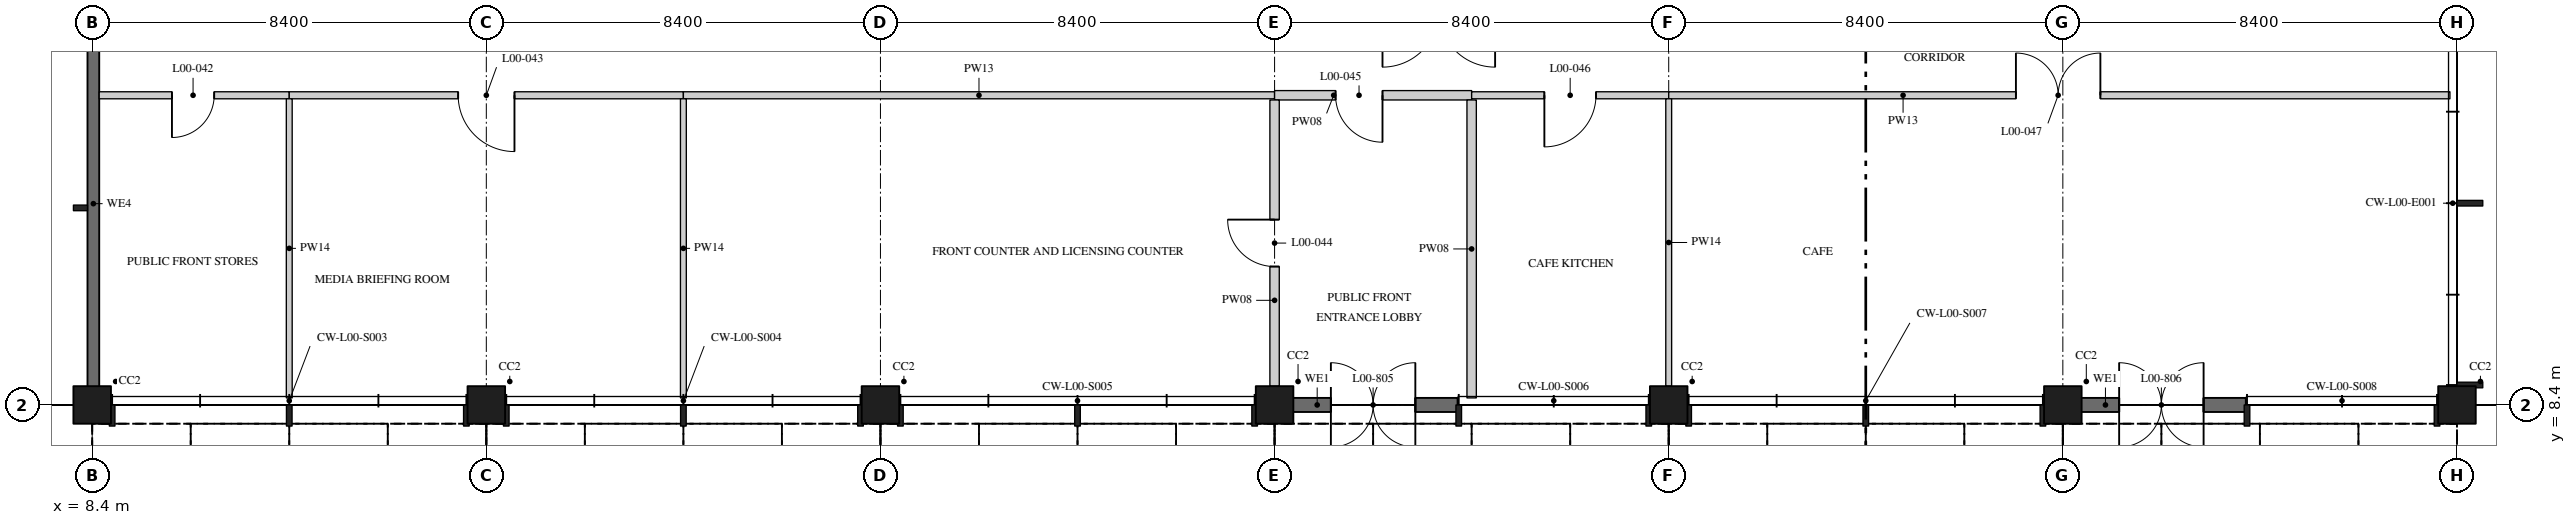
"""IFC4 building model, lengths in metres.
Left out: names, types, materials, properties, quantities, classifications, styles, units other than length and angle.
Written with IfcOpenShell. Run it as: python <this file> out.ifc"""

import sys

from ifc_helpers import new_model, si_unit, direction, frame, frame_2d, origin, origin_2d, place, context, subcontext, project, spatial, rectangle, extrude, element, fill, save


model = new_model("IFC4")
c1 = context("Model", 3, precision=1e-05, world=origin(), true_north=direction((0.0, 1.0)))
c2 = subcontext(c1, "Body", "Model", "MODEL_VIEW")
j1 = project(units=[si_unit("LENGTHUNIT", "METRE"), si_unit("PLANEANGLEUNIT", "RADIAN")], contexts=[c1])
p1 = place(None, origin())
s1 = spatial("IfcSite", under=j1, at=p1, CompositionType="ELEMENT")
p2 = place(p1, origin())
s2 = spatial("IfcBuilding", under=s1, at=p2, CompositionType="ELEMENT")
p3 = place(p2, origin())
s3 = spatial("IfcBuildingStorey", under=s2, at=p3, CompositionType="ELEMENT", Elevation=0.0)
for number, where, z_axis, x_axis in (
    (1, (8.4, 8.4, 0.0), (0.0, 0.0, 1.0), (1.0, 0.0, 0.0)),
    (2, (16.8, 8.4, 0.0), (0.0, 0.0, 1.0), (1.0, 0.0, 0.0)),
    (3, (25.2, 8.4, 0.0), (0.0, 0.0, 1.0), (1.0, 0.0, 0.0)),
    (4, (33.6, 8.4, 0.0), (0.0, 0.0, 1.0), (1.0, 0.0, 0.0)),
    (5, (42.0, 8.4, 0.0), (0.0, 0.0, 1.0), (1.0, 0.0, 0.0)),
    (6, (50.4, 8.4, 0.0), (0.0, 0.0, 1.0), (1.0, 0.0, 0.0)),
    (7, (58.8, 8.4, 0.0), (0.0, 0.0, 1.0), (1.0, 0.0, 0.0)),
):
    element("IfcColumn", number, at=place(p3, frame(where, z_axis=z_axis, x_axis=x_axis)), inside=s3, PredefinedType="COLUMN", context=c2, shape_type="SweptSolid", body=[
        extrude(rectangle(XDim=0.8, YDim=0.8, at=origin_2d()), origin(), (0.0, 0.0, 1.0), 5.05),
    ])
p4 = place(p3, frame((8.55, 15.0, 0.0), z_axis=(0.0, 0.0, 1.0), x_axis=(1.0, 0.0, 0.0)))
e8 = element("IfcWall", 8, at=p4, inside=s3, PredefinedType="PARTITIONING", context=c2, shape_type="SweptSolid", body=[
    extrude(rectangle(XDim=4.05, YDim=0.15, at=frame_2d((2.025, 0.0))), origin(), (0.0, 0.0, 1.0), 5.05),
])
p5 = place(p4, frame((1.55, 0.0, 0.0)))
e9 = element("IfcOpeningElement", 9, at=p5, cuts=e8, PredefinedType="OPENING", context=c2, shape_type="SweptSolid", body=[
    extrude(rectangle(XDim=0.9, YDim=2.1, at=frame_2d((0.45, 1.05))), frame((0.0, 0.085, 0.0), z_axis=(0.0, -1.0, 0.0), x_axis=(1.0, 0.0, 0.0)), (0.0, 0.0, 1.0), 0.17),
])
p6 = place(p3, frame((12.6, 15.0, 0.0), z_axis=(0.0, 0.0, 1.0), x_axis=(1.0, 0.0, 0.0)))
e10 = element("IfcWall", 10, at=p6, inside=s3, PredefinedType="PARTITIONING", context=c2, shape_type="SweptSolid", body=[
    extrude(rectangle(XDim=8.4, YDim=0.15, at=frame_2d((4.2, 0.0))), origin(), (0.0, 0.0, 1.0), 5.05),
])
p7 = place(p6, frame((3.6, 0.0, 0.0)))
e11 = element("IfcOpeningElement", 11, at=p7, cuts=e10, PredefinedType="OPENING", context=c2, shape_type="SweptSolid", body=[
    extrude(rectangle(XDim=1.2, YDim=2.4, at=frame_2d((0.6, 1.2))), frame((0.0, 0.085, 0.0), z_axis=(0.0, -1.0, 0.0), x_axis=(1.0, 0.0, 0.0)), (0.0, 0.0, 1.0), 0.17),
])
p8 = place(p3, frame((21.0, 15.0, 0.0), z_axis=(0.0, 0.0, 1.0), x_axis=(1.0, 0.0, 0.0)))
e12 = element("IfcWall", 12, at=p8, inside=s3, PredefinedType="PARTITIONING", context=c2, shape_type="SweptSolid", body=[
    extrude(rectangle(XDim=12.6, YDim=0.15, at=frame_2d((6.3, 0.0))), origin(), (0.0, 0.0, 1.0), 5.05),
])
p9 = place(p3, frame((33.6, 15.0, 0.0), z_axis=(0.0, 0.0, 1.0), x_axis=(1.0, 0.0, 0.0)))
e13 = element("IfcWall", 13, at=p9, inside=s3, PredefinedType="PARTITIONING", context=c2, shape_type="SweptSolid", body=[
    extrude(rectangle(XDim=4.2, YDim=0.2, at=frame_2d((2.1, 0.0))), origin(), (0.0, 0.0, 1.0), 5.05),
])
p10 = place(p9, frame((1.3, 0.0, 0.0)))
e14 = element("IfcOpeningElement", 14, at=p10, cuts=e13, PredefinedType="OPENING", context=c2, shape_type="SweptSolid", body=[
    extrude(rectangle(XDim=1.0, YDim=2.4, at=frame_2d((0.5, 1.2))), frame((0.0, 0.11, 0.0), z_axis=(0.0, -1.0, 0.0), x_axis=(1.0, 0.0, 0.0)), (0.0, 0.0, 1.0), 0.22),
])
p11 = place(p3, frame((37.8, 15.0, 0.0), z_axis=(0.0, 0.0, 1.0), x_axis=(1.0, 0.0, 0.0)))
e15 = element("IfcWall", 15, at=p11, inside=s3, PredefinedType="PARTITIONING", context=c2, shape_type="SweptSolid", body=[
    extrude(rectangle(XDim=4.2, YDim=0.15, at=frame_2d((2.1, 0.0))), origin(), (0.0, 0.0, 1.0), 5.05),
])
p12 = place(p11, frame((1.55, 0.0, 0.0)))
e16 = element("IfcOpeningElement", 16, at=p12, cuts=e15, PredefinedType="OPENING", context=c2, shape_type="SweptSolid", body=[
    extrude(rectangle(XDim=1.1, YDim=2.1, at=frame_2d((0.55, 1.05))), frame((0.0, 0.085, 0.0), z_axis=(0.0, -1.0, 0.0), x_axis=(1.0, 0.0, 0.0)), (0.0, 0.0, 1.0), 0.17),
])
p13 = place(p3, frame((42.0, 15.0, 0.0), z_axis=(0.0, 0.0, 1.0), x_axis=(1.0, 0.0, 0.0)))
e17 = element("IfcWall", 17, at=p13, inside=s3, PredefinedType="PARTITIONING", context=c2, shape_type="SweptSolid", body=[
    extrude(rectangle(XDim=16.65, YDim=0.15, at=frame_2d((8.325, 0.0))), origin(), (0.0, 0.0, 1.0), 5.05),
])
p14 = place(p13, frame((7.4, 0.0, 0.0)))
e18 = element("IfcOpeningElement", 18, at=p14, cuts=e17, PredefinedType="OPENING", context=c2, shape_type="SweptSolid", body=[
    extrude(rectangle(XDim=1.8, YDim=2.4, at=frame_2d((0.9, 1.2))), frame((0.0, 0.085, 0.0), z_axis=(0.0, -1.0, 0.0), x_axis=(1.0, 0.0, 0.0)), (0.0, 0.0, 1.0), 0.17),
])
for number, where, z_axis, x_axis in (
    (19, (12.6, 8.55, 0.0), (0.0, 0.0, 1.0), (0.0, 1.0, 0.0)),
    (20, (21.0, 8.55, 0.0), (0.0, 0.0, 1.0), (0.0, 1.0, 0.0)),
):
    element("IfcWall", number, at=place(p3, frame(where, z_axis=z_axis, x_axis=x_axis)), inside=s3, PredefinedType="PARTITIONING", context=c2, shape_type="SweptSolid", body=[
        extrude(rectangle(XDim=6.375, YDim=0.125, at=frame_2d((3.188, 0.0))), origin(), (0.0, 0.0, 1.0), 5.05),
    ])
p15 = place(p3, frame((33.6, 8.8, 0.0), z_axis=(0.0, 0.0, 1.0), x_axis=(0.0, 1.0, 0.0)))
e21 = element("IfcWall", 21, at=p15, inside=s3, PredefinedType="PARTITIONING", context=c2, shape_type="SweptSolid", body=[
    extrude(rectangle(XDim=6.1, YDim=0.2, at=frame_2d((3.05, 0.0))), origin(), (0.0, 0.0, 1.0), 5.05),
])
p16 = place(p15, frame((2.55, 0.0, 0.0)))
e22 = element("IfcOpeningElement", 22, at=p16, cuts=e21, PredefinedType="OPENING", context=c2, shape_type="SweptSolid", body=[
    extrude(rectangle(XDim=1.0, YDim=2.4, at=frame_2d((0.5, 1.2))), frame((0.0, 0.11, 0.0), z_axis=(0.0, -1.0, 0.0), x_axis=(1.0, 0.0, 0.0)), (0.0, 0.0, 1.0), 0.22),
])
p17 = place(p3, frame((37.8, 8.55, 0.0), z_axis=(0.0, 0.0, 1.0), x_axis=(0.0, 1.0, 0.0)))
e23 = element("IfcWall", 23, at=p17, inside=s3, PredefinedType="PARTITIONING", context=c2, shape_type="SweptSolid", body=[
    extrude(rectangle(XDim=6.35, YDim=0.2, at=frame_2d((3.175, 0.0))), origin(), (0.0, 0.0, 1.0), 5.05),
])
p18 = place(p3, frame((42.0, 8.8, 0.0), z_axis=(0.0, 0.0, 1.0), x_axis=(0.0, 1.0, 0.0)))
e24 = element("IfcWall", 24, at=p18, inside=s3, PredefinedType="PARTITIONING", context=c2, shape_type="SweptSolid", body=[
    extrude(rectangle(XDim=6.125, YDim=0.125, at=frame_2d((3.062, 0.0))), origin(), (0.0, 0.0, 1.0), 5.05),
])
p19 = place(p3, frame((8.425, 16.6, 0.0), z_axis=(0.0, 0.0, 1.0), x_axis=(0.0, -1.0, 0.0)))
e25 = element("IfcWall", 25, at=p19, inside=s3, PredefinedType="SOLIDWALL", context=c2, shape_type="SweptSolid", body=[
    extrude(rectangle(XDim=7.82, YDim=0.25, at=frame_2d((3.91, 0.0))), origin(), (0.0, 0.0, 1.0), 5.05),
])
p20 = place(p3, frame((33.98, 8.4, 0.0), z_axis=(0.0, 0.0, 1.0), x_axis=(1.0, 0.0, 0.0)))
e26 = element("IfcWall", 26, at=p20, inside=s3, PredefinedType="SOLIDWALL", context=c2, shape_type="SweptSolid", body=[
    extrude(rectangle(XDim=3.52, YDim=0.3, at=frame_2d((1.76, 0.0))), origin(), (0.0, 0.0, 1.0), 5.05),
])
p21 = place(p20, frame((0.82, 0.0, 0.0)))
e27 = element("IfcOpeningElement", 27, at=p21, cuts=e26, PredefinedType="OPENING", context=c2, shape_type="SweptSolid", body=[
    extrude(rectangle(XDim=1.8, YDim=2.4, at=frame_2d((0.9, 1.2))), frame((0.0, 0.16, 0.0), z_axis=(0.0, -1.0, 0.0), x_axis=(1.0, 0.0, 0.0)), (0.0, 0.0, 1.0), 0.32),
])
p22 = place(p3, frame((50.78, 8.4, 0.0), z_axis=(0.0, 0.0, 1.0), x_axis=(1.0, 0.0, 0.0)))
e28 = element("IfcWall", 28, at=p22, inside=s3, PredefinedType="SOLIDWALL", context=c2, shape_type="SweptSolid", body=[
    extrude(rectangle(XDim=3.52, YDim=0.3, at=frame_2d((1.76, 0.0))), origin(), (0.0, 0.0, 1.0), 5.05),
])
p23 = place(p22, frame((0.82, 0.0, 0.0)))
e29 = element("IfcOpeningElement", 29, at=p23, cuts=e28, PredefinedType="OPENING", context=c2, shape_type="SweptSolid", body=[
    extrude(rectangle(XDim=1.8, YDim=2.4, at=frame_2d((0.9, 1.2))), frame((0.0, 0.16, 0.0), z_axis=(0.0, -1.0, 0.0), x_axis=(1.0, 0.0, 0.0)), (0.0, 0.0, 1.0), 0.32),
])
p24 = place(p5, frame((0.9, 0.0, 0.0), z_axis=(0.0, 0.0, 1.0), x_axis=(-1.0, 0.0, 0.0)))
e30 = element("IfcDoor", 30, at=p24, inside=s3, OperationType="SINGLE_SWING_LEFT", PredefinedType="DOOR", context=c2, shape_type="SweptSolid", body=[
    extrude(rectangle(XDim=0.9, YDim=2.1, at=frame_2d((0.45, 1.05))), frame((0.0, 0.025, 0.0), z_axis=(0.0, -1.0, 0.0), x_axis=(1.0, 0.0, 0.0)), (0.0, 0.0, 1.0), 0.05),
])
fill(e9, e30)
p25 = place(p7, frame((1.2, 0.0, 0.0), z_axis=(0.0, 0.0, 1.0), x_axis=(-1.0, 0.0, 0.0)))
e31 = element("IfcDoor", 31, at=p25, inside=s3, OperationType="SINGLE_SWING_RIGHT", PredefinedType="DOOR", context=c2, shape_type="SweptSolid", body=[
    extrude(rectangle(XDim=1.2, YDim=2.4, at=frame_2d((0.6, 1.2))), frame((0.0, 0.025, 0.0), z_axis=(0.0, -1.0, 0.0), x_axis=(1.0, 0.0, 0.0)), (0.0, 0.0, 1.0), 0.05),
])
fill(e11, e31)
p26 = place(p16, origin())
e32 = element("IfcDoor", 32, at=p26, inside=s3, OperationType="SINGLE_SWING_LEFT", PredefinedType="DOOR", context=c2, shape_type="SweptSolid", body=[
    extrude(rectangle(XDim=1.0, YDim=2.4, at=frame_2d((0.5, 1.2))), frame((0.0, 0.035, 0.0), z_axis=(0.0, -1.0, 0.0), x_axis=(1.0, 0.0, 0.0)), (0.0, 0.0, 1.0), 0.07),
])
fill(e22, e32)
p27 = place(p10, frame((1.0, 0.0, 0.0), z_axis=(0.0, 0.0, 1.0), x_axis=(-1.0, 0.0, 0.0)))
e33 = element("IfcDoor", 33, at=p27, inside=s3, OperationType="SINGLE_SWING_RIGHT", PredefinedType="DOOR", context=c2, shape_type="SweptSolid", body=[
    extrude(rectangle(XDim=1.0, YDim=2.4, at=frame_2d((0.5, 1.2))), frame((0.0, 0.03, 0.0), z_axis=(0.0, -1.0, 0.0), x_axis=(1.0, 0.0, 0.0)), (0.0, 0.0, 1.0), 0.06),
])
fill(e14, e33)
p28 = place(p12, frame((1.1, 0.0, 0.0), z_axis=(0.0, 0.0, 1.0), x_axis=(-1.0, 0.0, 0.0)))
e34 = element("IfcDoor", 34, at=p28, inside=s3, OperationType="SINGLE_SWING_LEFT", PredefinedType="DOOR", context=c2, shape_type="SweptSolid", body=[
    extrude(rectangle(XDim=1.1, YDim=2.1, at=frame_2d((0.55, 1.05))), frame((0.0, 0.025, 0.0), z_axis=(0.0, -1.0, 0.0), x_axis=(1.0, 0.0, 0.0)), (0.0, 0.0, 1.0), 0.05),
])
fill(e16, e34)
p29 = place(p14, origin())
e35 = element("IfcDoor", 35, at=p29, inside=s3, OperationType="DOUBLE_DOOR_SINGLE_SWING", PredefinedType="DOOR", context=c2, shape_type="SweptSolid", body=[
    extrude(rectangle(XDim=1.8, YDim=2.4, at=frame_2d((0.9, 1.2))), frame((0.0, 0.025, 0.0), z_axis=(0.0, -1.0, 0.0), x_axis=(1.0, 0.0, 0.0)), (0.0, 0.0, 1.0), 0.05),
])
fill(e18, e35)
p30 = place(p21, frame((1.8, 0.0, 0.0), z_axis=(0.0, 0.0, 1.0), x_axis=(-1.0, 0.0, 0.0)))
e36 = element("IfcDoor", 36, at=p30, inside=s3, OperationType="DOUBLE_DOOR_DOUBLE_SWING", PredefinedType="DOOR", context=c2, shape_type="SweptSolid", body=[
    extrude(rectangle(XDim=1.8, YDim=2.4, at=frame_2d((0.9, 1.2))), frame((0.0, 0.025, 0.0), z_axis=(0.0, -1.0, 0.0), x_axis=(1.0, 0.0, 0.0)), (0.0, 0.0, 1.0), 0.05),
])
fill(e27, e36)
p31 = place(p23, frame((1.8, 0.0, 0.0), z_axis=(0.0, 0.0, 1.0), x_axis=(-1.0, 0.0, 0.0)))
e37 = element("IfcDoor", 37, at=p31, inside=s3, OperationType="DOUBLE_DOOR_DOUBLE_SWING", PredefinedType="DOOR", context=c2, shape_type="SweptSolid", body=[
    extrude(rectangle(XDim=1.8, YDim=2.4, at=frame_2d((0.9, 1.2))), frame((0.0, 0.025, 0.0), z_axis=(0.0, -1.0, 0.0), x_axis=(1.0, 0.0, 0.0)), (0.0, 0.0, 1.0), 0.05),
])
fill(e29, e37)
save(model, sys.argv[1])
